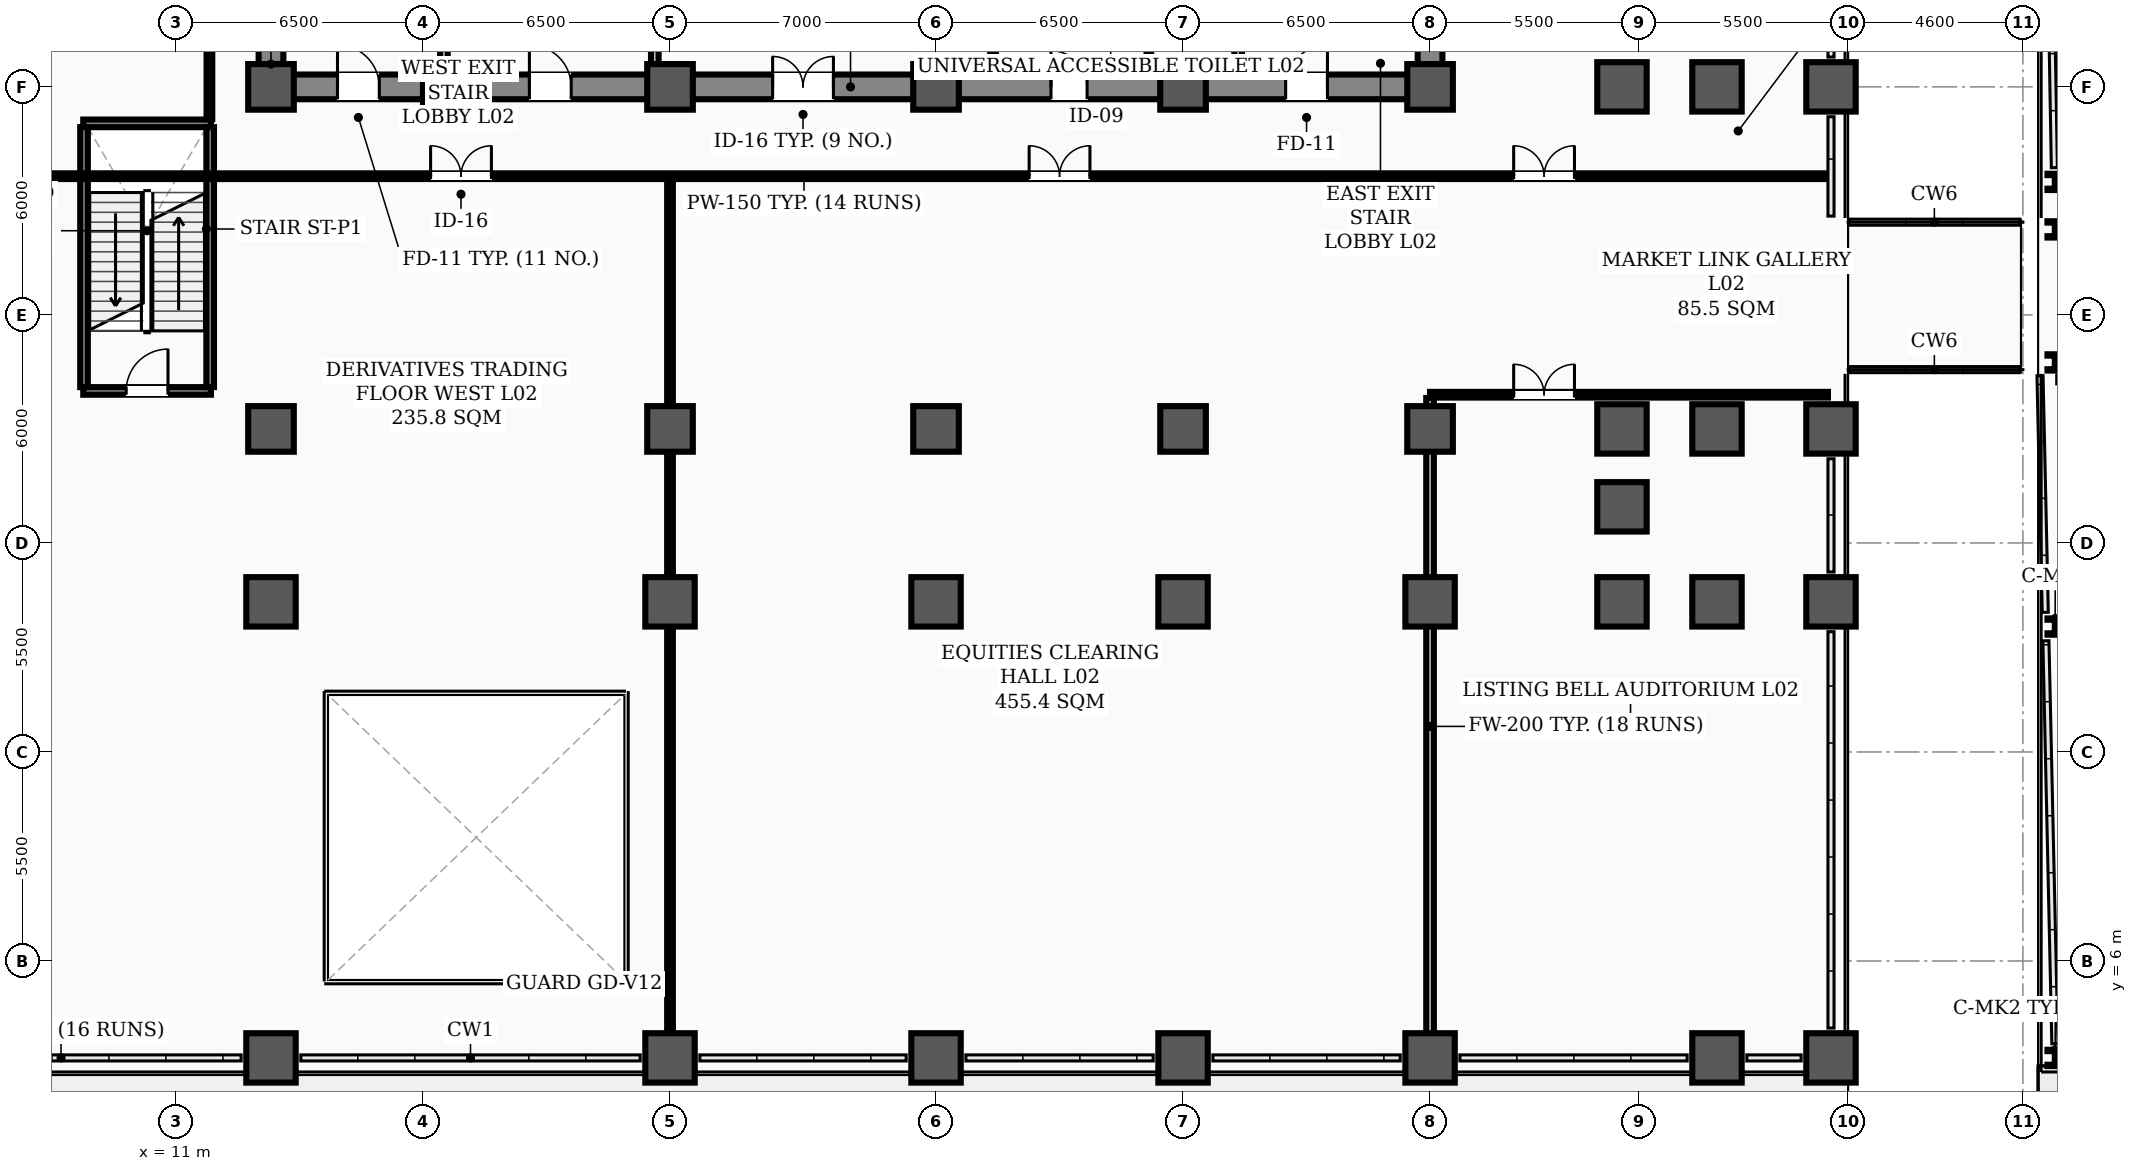
"""IFC4 building model, lengths in metres.
Left out: names, types, materials, properties, quantities, classifications, styles, units other than length and angle.
Written with IfcOpenShell. Run it as: python <this file> out.ifc"""

import sys

from ifc_helpers import new_model, si_unit, direction, frame, frame_2d, origin, origin_2d, place, context, subcontext, project, spatial, rectangle, hollow_rectangle, i_section, extrude, element, fill, save


model = new_model("IFC4")
c1 = context("Model", 3, precision=1e-05, world=origin(), true_north=direction((0.0, 1.0)))
c2 = subcontext(c1, "Body", "Model", "MODEL_VIEW")
j1 = project(units=[si_unit("LENGTHUNIT", "METRE"), si_unit("PLANEANGLEUNIT", "RADIAN")], contexts=[c1])
p1 = place(None, origin())
s1 = spatial("IfcSite", under=j1, at=p1, CompositionType="ELEMENT")
p2 = place(p1, origin())
s2 = spatial("IfcBuilding", under=s1, at=p2, CompositionType="ELEMENT")
p3 = place(p2, frame((0.0, 0.0, 5.8)))
s3 = spatial("IfcBuildingStorey", under=s2, at=p3, CompositionType="ELEMENT", Elevation=5.8)
for number, where, z_axis, x_axis in (
    (1, (13.5, 29.0, 0.0), (0.0, 0.0, 1.0), (1.0, 0.0, 0.0)),
    (2, (18.1, 29.0, 0.0), (0.0, 0.0, 1.0), (1.0, 0.0, 0.0)),
    (3, (24.0, 29.0, 0.0), (0.0, 0.0, 1.0), (1.0, 0.0, 0.0)),
    (4, (31.0, 29.0, 0.0), (0.0, 0.0, 1.0), (1.0, 0.0, 0.0)),
    (5, (37.5, 29.0, 0.0), (0.0, 0.0, 1.0), (1.0, 0.0, 0.0)),
    (6, (44.0, 29.0, 0.0), (0.0, 0.0, 1.0), (1.0, 0.0, 0.0)),
    (7, (13.5, 20.0, 0.0), (0.0, 0.0, 1.0), (1.0, 0.0, 0.0)),
    (8, (24.0, 20.0, 0.0), (0.0, 0.0, 1.0), (1.0, 0.0, 0.0)),
    (9, (31.0, 20.0, 0.0), (0.0, 0.0, 1.0), (1.0, 0.0, 0.0)),
    (10, (37.5, 20.0, 0.0), (0.0, 0.0, 1.0), (1.0, 0.0, 0.0)),
    (11, (44.0, 20.0, 0.0), (0.0, 0.0, 1.0), (1.0, 0.0, 0.0)),
):
    element("IfcColumn", number, at=place(p3, frame(where, z_axis=z_axis, x_axis=x_axis)), inside=s3, PredefinedType="COLUMN", context=c2, shape_type="SweptSolid", body=[
        extrude(hollow_rectangle(XDim=1.2, YDim=1.2, WallThickness=0.04, InnerFilletRadius=0.02, OuterFilletRadius=0.06, at=origin_2d()), origin(), (0.0, 0.0, 1.0), 5.4),
    ])
for number, where, z_axis, x_axis in (
    (12, (13.5, 3.45, 0.0), (0.0, 0.0, 1.0), (1.0, 0.0, 0.0)),
    (13, (13.5, 15.45, 0.0), (0.0, 0.0, 1.0), (1.0, 0.0, 0.0)),
    (14, (24.0, 3.45, 0.0), (0.0, 0.0, 1.0), (1.0, 0.0, 0.0)),
    (15, (24.0, 15.45, 0.0), (0.0, 0.0, 1.0), (1.0, 0.0, 0.0)),
    (16, (31.0, 3.45, 0.0), (0.0, 0.0, 1.0), (1.0, 0.0, 0.0)),
    (17, (31.0, 15.45, 0.0), (0.0, 0.0, 1.0), (1.0, 0.0, 0.0)),
    (18, (37.5, 3.45, 0.0), (0.0, 0.0, 1.0), (1.0, 0.0, 0.0)),
    (19, (37.5, 15.45, 0.0), (0.0, 0.0, 1.0), (1.0, 0.0, 0.0)),
    (20, (44.0, 3.45, 0.0), (0.0, 0.0, 1.0), (1.0, 0.0, 0.0)),
    (21, (44.0, 15.45, 0.0), (0.0, 0.0, 1.0), (1.0, 0.0, 0.0)),
    (22, (49.05, 15.45, 0.0), (0.0, 0.0, 1.0), (1.0, 0.0, 0.0)),
    (23, (49.05, 17.95, 0.0), (0.0, 0.0, 1.0), (1.0, 0.0, 0.0)),
    (24, (49.05, 20.0, 0.0), (0.0, 0.0, 1.0), (1.0, 0.0, 0.0)),
    (25, (49.05, 29.0, 0.0), (0.0, 0.0, 1.0), (1.0, 0.0, 0.0)),
    (26, (51.55, 3.45, 0.0), (0.0, 0.0, 1.0), (1.0, 0.0, 0.0)),
    (27, (51.55, 15.45, 0.0), (0.0, 0.0, 1.0), (1.0, 0.0, 0.0)),
    (28, (51.55, 20.0, 0.0), (0.0, 0.0, 1.0), (1.0, 0.0, 0.0)),
    (29, (51.55, 29.0, 0.0), (0.0, 0.0, 1.0), (1.0, 0.0, 0.0)),
    (30, (54.55, 3.45, 0.0), (0.0, 0.0, 1.0), (1.0, 0.0, 0.0)),
    (31, (54.55, 15.45, 0.0), (0.0, 0.0, 1.0), (1.0, 0.0, 0.0)),
    (32, (54.55, 20.0, 0.0), (0.0, 0.0, 1.0), (1.0, 0.0, 0.0)),
    (33, (54.55, 29.0, 0.0), (0.0, 0.0, 1.0), (1.0, 0.0, 0.0)),
):
    element("IfcColumn", number, at=place(p3, frame(where, z_axis=z_axis, x_axis=x_axis)), inside=s3, PredefinedType="COLUMN", context=c2, shape_type="SweptSolid", body=[
        extrude(rectangle(XDim=1.3, YDim=1.3, at=origin_2d()), origin(), (0.0, 0.0, 1.0), 5.4),
    ])
for number, where, z_axis, x_axis in (
    (34, (60.45, 3.45, 0.0), (0.0, 0.0, 1.0), (1.0, 0.0, 0.0)),
    (35, (60.45, 14.8, 0.0), (0.0, 0.0, 1.0), (1.0, 0.0, 0.0)),
    (36, (60.45, 21.75, 0.0), (0.0, 0.0, 1.0), (1.0, 0.0, 0.0)),
    (37, (60.45, 25.25, 0.0), (0.0, 0.0, 1.0), (1.0, 0.0, 0.0)),
    (38, (60.45, 26.5, 0.0), (0.0, 0.0, 1.0), (1.0, 0.0, 0.0)),
):
    element("IfcColumn", number, at=place(p3, frame(where, z_axis=z_axis, x_axis=x_axis)), inside=s3, PredefinedType="COLUMN", context=c2, shape_type="SweptSolid", body=[
        extrude(i_section(OverallWidth=0.407, OverallDepth=0.428, WebThickness=0.02, FlangeThickness=0.035, FilletRadius=0.022, at=origin_2d()), origin(), (0.0, 0.0, 1.0), 5.4),
    ])
p4 = place(p3, frame((60.45, 3.45, 0.0), z_axis=(0.0, 0.0, 1.0), x_axis=(1.0, 0.0, 0.0)))
e39 = element("IfcWall", 39, at=p4, inside=s3, PredefinedType="STANDARD", context=c2, shape_type="SweptSolid", body=[
    extrude(rectangle(XDim=16.7, YDim=0.25, at=frame_2d((8.35, 0.0))), origin(), (0.0, 0.0, 1.0), 4.5),
])
p5 = place(p4, frame((2.85, 0.0, 0.95)))
e40 = element("IfcOpeningElement", 40, at=p5, cuts=e39, PredefinedType="OPENING", context=c2, shape_type="SweptSolid", body=[
    extrude(rectangle(XDim=2.0, YDim=1.8, at=frame_2d((1.0, 0.9))), frame((0.0, 0.135, 0.0), z_axis=(0.0, -1.0, 0.0), x_axis=(1.0, 0.0, 0.0)), (0.0, 0.0, 1.0), 0.27),
])
p6 = place(p4, frame((11.35, 0.0, 0.95)))
e41 = element("IfcOpeningElement", 41, at=p6, cuts=e39, PredefinedType="OPENING", context=c2, shape_type="SweptSolid", body=[
    extrude(rectangle(XDim=2.0, YDim=1.8, at=frame_2d((1.0, 0.9))), frame((0.0, 0.135, 0.0), z_axis=(0.0, -1.0, 0.0), x_axis=(1.0, 0.0, 0.0)), (0.0, 0.0, 1.0), 0.27),
])
p7 = place(p3, frame((13.5, 29.0, 0.0), z_axis=(0.0, 0.0, 1.0), x_axis=(1.0, 0.0, 0.0)))
e42 = element("IfcWall", 42, at=p7, inside=s3, PredefinedType="SHEAR", context=c2, shape_type="SweptSolid", body=[
    extrude(rectangle(XDim=30.5, YDim=0.65, at=frame_2d((15.25, 0.0))), origin(), (0.0, 0.0, 1.0), 5.15),
])
p8 = place(p7, frame((1.75, 0.0, 0.0)))
e43 = element("IfcOpeningElement", 43, at=p8, cuts=e42, PredefinedType="OPENING", context=c2, shape_type="SweptSolid", body=[
    extrude(rectangle(XDim=1.1, YDim=2.08, at=frame_2d((0.55, 1.04))), frame((0.0, 0.335, 0.0), z_axis=(0.0, -1.0, 0.0), x_axis=(1.0, 0.0, 0.0)), (0.0, 0.0, 1.0), 0.67),
])
p9 = place(p7, frame((26.7, 0.0, 0.0)))
e44 = element("IfcOpeningElement", 44, at=p9, cuts=e42, PredefinedType="OPENING", context=c2, shape_type="SweptSolid", body=[
    extrude(rectangle(XDim=1.1, YDim=2.08, at=frame_2d((0.55, 1.04))), frame((0.0, 0.335, 0.0), z_axis=(0.0, -1.0, 0.0), x_axis=(1.0, 0.0, 0.0)), (0.0, 0.0, 1.0), 0.67),
])
p10 = place(p7, frame((6.8, 0.0, 0.0)))
e45 = element("IfcOpeningElement", 45, at=p10, cuts=e42, PredefinedType="OPENING", context=c2, shape_type="SweptSolid", body=[
    extrude(rectangle(XDim=1.1, YDim=2.08, at=frame_2d((0.55, 1.04))), frame((0.0, 0.335, 0.0), z_axis=(0.0, -1.0, 0.0), x_axis=(1.0, 0.0, 0.0)), (0.0, 0.0, 1.0), 0.67),
])
p11 = place(p7, frame((13.2, 0.0, 0.0)))
e46 = element("IfcOpeningElement", 46, at=p11, cuts=e42, PredefinedType="OPENING", context=c2, shape_type="SweptSolid", body=[
    extrude(rectangle(XDim=1.6, YDim=2.08, at=frame_2d((0.8, 1.04))), frame((0.0, 0.335, 0.0), z_axis=(0.0, -1.0, 0.0), x_axis=(1.0, 0.0, 0.0)), (0.0, 0.0, 1.0), 0.67),
])
p12 = place(p7, frame((20.525, 0.0, 0.0)))
e47 = element("IfcOpeningElement", 47, at=p12, cuts=e42, PredefinedType="OPENING", context=c2, shape_type="SweptSolid", body=[
    extrude(rectangle(XDim=0.95, YDim=2.08, at=frame_2d((0.475, 1.04))), frame((0.0, 0.335, 0.0), z_axis=(0.0, -1.0, 0.0), x_axis=(1.0, 0.0, 0.0)), (0.0, 0.0, 1.0), 0.67),
])
for number, where, z_axis, x_axis in (
    (48, (13.5, 29.35, 0.0), (0.0, 0.0, 1.0), (0.0, 1.0, 0.0)),
    (49, (44.0, 29.35, 0.0), (0.0, 0.0, 1.0), (0.0, 1.0, 0.0)),
):
    element("IfcWall", number, at=place(p3, frame(where, z_axis=z_axis, x_axis=x_axis)), inside=s3, PredefinedType="SHEAR", context=c2, shape_type="SweptSolid", body=[
        extrude(rectangle(XDim=8.6, YDim=0.65, at=frame_2d((4.3, 0.0))), origin(), (0.0, 0.0, 1.0), 5.15),
    ])
p13 = place(p3, frame((8.56, 21.0, 0.0), z_axis=(0.0, 0.0, 1.0), x_axis=(1.0, 0.0, 0.0)))
e50 = element("IfcWall", 50, at=p13, inside=s3, PredefinedType="STANDARD", context=c2, shape_type="SweptSolid", body=[
    extrude(rectangle(XDim=3.36, YDim=0.2, at=frame_2d((1.68, 0.0))), origin(), (0.0, 0.0, 1.0), 5.15),
])
p14 = place(p13, frame((1.13, 0.0, 0.0)))
e51 = element("IfcOpeningElement", 51, at=p14, cuts=e50, PredefinedType="OPENING", context=c2, shape_type="SweptSolid", body=[
    extrude(rectangle(XDim=1.1, YDim=2.08, at=frame_2d((0.55, 1.04))), frame((0.0, 0.11, 0.0), z_axis=(0.0, -1.0, 0.0), x_axis=(1.0, 0.0, 0.0)), (0.0, 0.0, 1.0), 0.22),
])
p15 = place(p3, frame((8.56, 28.04, 0.0), z_axis=(0.0, 0.0, 1.0), x_axis=(1.0, 0.0, 0.0)))
e52 = element("IfcWall", 52, at=p15, inside=s3, PredefinedType="STANDARD", context=c2, shape_type="SweptSolid", body=[
    extrude(rectangle(XDim=3.36, YDim=0.2, at=frame_2d((1.68, 0.0))), origin(), (0.0, 0.0, 1.0), 5.15),
])
for number, where, z_axis, x_axis in (
    (53, (8.58, 21.1, 0.0), (0.0, 0.0, 1.0), (0.0, 1.0, 0.0)),
    (54, (11.9, 21.1, 0.0), (0.0, 0.0, 1.0), (0.0, 1.0, 0.0)),
):
    element("IfcWall", number, at=place(p3, frame(where, z_axis=z_axis, x_axis=x_axis)), inside=s3, PredefinedType="STANDARD", context=c2, shape_type="SweptSolid", body=[
        extrude(rectangle(XDim=6.84, YDim=0.2, at=frame_2d((3.42, 0.0))), origin(), (0.0, 0.0, 1.0), 5.15),
    ])
p16 = place(p3, frame((0.58, 26.65, 0.0), z_axis=(0.0, 0.0, 1.0), x_axis=(1.0, 0.0, 0.0)))
e55 = element("IfcWall", 55, at=p16, inside=s3, PredefinedType="PARTITIONING", context=c2, shape_type="SweptSolid", body=[
    extrude(rectangle(XDim=53.89, YDim=0.15, at=frame_2d((26.945, 0.0))), origin(), (0.0, 0.0, 1.0), 4.43),
])
p17 = place(p16, frame((17.12, 0.0, 0.0)))
e56 = element("IfcOpeningElement", 56, at=p17, cuts=e55, PredefinedType="OPENING", context=c2, shape_type="SweptSolid", body=[
    extrude(rectangle(XDim=1.6, YDim=2.08, at=frame_2d((0.8, 1.04))), frame((0.0, 0.085, 0.0), z_axis=(0.0, -1.0, 0.0), x_axis=(1.0, 0.0, 0.0)), (0.0, 0.0, 1.0), 0.17),
])
p18 = place(p16, frame((32.87, 0.0, 0.0)))
e57 = element("IfcOpeningElement", 57, at=p18, cuts=e55, PredefinedType="OPENING", context=c2, shape_type="SweptSolid", body=[
    extrude(rectangle(XDim=1.6, YDim=2.08, at=frame_2d((0.8, 1.04))), frame((0.0, 0.085, 0.0), z_axis=(0.0, -1.0, 0.0), x_axis=(1.0, 0.0, 0.0)), (0.0, 0.0, 1.0), 0.17),
])
p19 = place(p16, frame((45.62, 0.0, 0.0)))
e58 = element("IfcOpeningElement", 58, at=p19, cuts=e55, PredefinedType="OPENING", context=c2, shape_type="SweptSolid", body=[
    extrude(rectangle(XDim=1.6, YDim=2.08, at=frame_2d((0.8, 1.04))), frame((0.0, 0.085, 0.0), z_axis=(0.0, -1.0, 0.0), x_axis=(1.0, 0.0, 0.0)), (0.0, 0.0, 1.0), 0.17),
])
p20 = place(p3, frame((44.0, 20.9, 0.0), z_axis=(0.0, 0.0, 1.0), x_axis=(1.0, 0.0, 0.0)))
e59 = element("IfcWall", 59, at=p20, inside=s3, PredefinedType="PARTITIONING", context=c2, shape_type="SweptSolid", body=[
    extrude(rectangle(XDim=10.47, YDim=0.15, at=frame_2d((5.235, 0.0))), origin(), (0.0, 0.0, 1.0), 4.43),
])
p21 = place(p20, frame((2.2, 0.0, 0.0)))
e60 = element("IfcOpeningElement", 60, at=p21, cuts=e59, PredefinedType="OPENING", context=c2, shape_type="SweptSolid", body=[
    extrude(rectangle(XDim=1.6, YDim=2.08, at=frame_2d((0.8, 1.04))), frame((0.0, 0.085, 0.0), z_axis=(0.0, -1.0, 0.0), x_axis=(1.0, 0.0, 0.0)), (0.0, 0.0, 1.0), 0.17),
])
p22 = place(p3, frame((24.0, 3.53, 0.0), z_axis=(0.0, 0.0, 1.0), x_axis=(0.0, 1.0, 0.0)))
e61 = element("IfcWall", 61, at=p22, inside=s3, PredefinedType="PARTITIONING", context=c2, shape_type="SweptSolid", body=[
    extrude(rectangle(XDim=23.035, YDim=0.15, at=frame_2d((11.518, 0.0))), origin(), (0.0, 0.0, 1.0), 4.33),
])
p23 = place(p3, frame((44.0, 3.53, 0.0), z_axis=(0.0, 0.0, 1.0), x_axis=(0.0, 1.0, 0.0)))
e62 = element("IfcWall", 62, at=p23, inside=s3, PredefinedType="STANDARD", context=c2, shape_type="SweptSolid", body=[
    extrude(rectangle(XDim=17.285, YDim=0.2, at=frame_2d((8.643, 0.0))), origin(), (0.0, 0.0, 1.0), 4.33),
])
p24 = place(p3, frame((11.88, 28.15, 0.0), z_axis=(0.0, 0.0, 1.0), x_axis=(0.0, 1.0, 0.0)))
e63 = element("IfcWall", 63, at=p24, inside=s3, PredefinedType="PARTITIONING", context=c2, shape_type="SweptSolid", body=[
    extrude(rectangle(XDim=12.165, YDim=0.15, at=frame_2d((6.083, 0.0))), origin(), (0.0, 0.0, 1.0), 4.33),
])
for number, where, z_axis, x_axis in (
    (64, (18.05, 29.335, 0.0), (0.0, 0.0, 1.0), (0.0, 1.0, 0.0)),
    (65, (38.95, 29.335, 0.0), (0.0, 0.0, 1.0), (0.0, 1.0, 0.0)),
):
    element("IfcWall", number, at=place(p3, frame(where, z_axis=z_axis, x_axis=x_axis)), inside=s3, PredefinedType="STANDARD", context=c2, shape_type="SweptSolid", body=[
        extrude(rectangle(XDim=0.965, YDim=0.2, at=frame_2d((0.482, 0.0))), origin(), (0.0, 0.0, 1.0), 4.33),
    ])
p25 = place(p3, frame((23.6, 29.335, 0.0), z_axis=(0.0, 0.0, 1.0), x_axis=(0.0, 1.0, 0.0)))
e66 = element("IfcWall", 66, at=p25, inside=s3, PredefinedType="STANDARD", context=c2, shape_type="SweptSolid", body=[
    extrude(rectangle(XDim=5.365, YDim=0.2, at=frame_2d((2.683, 0.0))), origin(), (0.0, 0.0, 1.0), 4.33),
])
p26 = place(p3, frame((32.5, 29.335, 0.0), z_axis=(0.0, 0.0, 1.0), x_axis=(0.0, 1.0, 0.0)))
e67 = element("IfcWall", 67, at=p26, inside=s3, PredefinedType="PARTITIONING", context=c2, shape_type="SweptSolid", body=[
    extrude(rectangle(XDim=2.43, YDim=0.15, at=frame_2d((1.215, 0.0))), origin(), (0.0, 0.0, 1.0), 4.33),
])
p27 = place(p3, frame((36.6, 29.335, 0.0), z_axis=(0.0, 0.0, 1.0), x_axis=(0.0, 1.0, 0.0)))
e68 = element("IfcWall", 68, at=p27, inside=s3, PredefinedType="PARTITIONING", context=c2, shape_type="SweptSolid", body=[
    extrude(rectangle(XDim=2.43, YDim=0.12, at=frame_2d((1.215, 0.0))), origin(), (0.0, 0.0, 1.0), 4.33),
])
p28 = place(p14, origin())
e69 = element("IfcDoor", 69, at=p28, inside=s3, OperationType="SINGLE_SWING_RIGHT", PredefinedType="DOOR", context=c2, shape_type="SweptSolid", body=[
    extrude(rectangle(XDim=1.1, YDim=2.08, at=frame_2d((0.55, 1.04))), frame((0.0, 0.025, 0.0), z_axis=(0.0, -1.0, 0.0), x_axis=(1.0, 0.0, 0.0)), (0.0, 0.0, 1.0), 0.05),
])
fill(e51, e69)
p29 = place(p17, origin())
e70 = element("IfcDoor", 70, at=p29, inside=s3, OperationType="DOUBLE_DOOR_SINGLE_SWING", PredefinedType="DOOR", context=c2, shape_type="SweptSolid", body=[
    extrude(rectangle(XDim=1.6, YDim=2.08, at=frame_2d((0.8, 1.04))), frame((0.0, 0.025, 0.0), z_axis=(0.0, -1.0, 0.0), x_axis=(1.0, 0.0, 0.0)), (0.0, 0.0, 1.0), 0.05),
])
fill(e56, e70)
p30 = place(p18, origin())
e71 = element("IfcDoor", 71, at=p30, inside=s3, OperationType="DOUBLE_DOOR_SINGLE_SWING", PredefinedType="DOOR", context=c2, shape_type="SweptSolid", body=[
    extrude(rectangle(XDim=1.6, YDim=2.08, at=frame_2d((0.8, 1.04))), frame((0.0, 0.025, 0.0), z_axis=(0.0, -1.0, 0.0), x_axis=(1.0, 0.0, 0.0)), (0.0, 0.0, 1.0), 0.05),
])
fill(e57, e71)
p31 = place(p21, origin())
e72 = element("IfcDoor", 72, at=p31, inside=s3, OperationType="DOUBLE_DOOR_SINGLE_SWING", PredefinedType="DOOR", context=c2, shape_type="SweptSolid", body=[
    extrude(rectangle(XDim=1.6, YDim=2.08, at=frame_2d((0.8, 1.04))), frame((0.0, 0.025, 0.0), z_axis=(0.0, -1.0, 0.0), x_axis=(1.0, 0.0, 0.0)), (0.0, 0.0, 1.0), 0.05),
])
fill(e60, e72)
p32 = place(p19, origin())
e73 = element("IfcDoor", 73, at=p32, inside=s3, OperationType="DOUBLE_DOOR_SINGLE_SWING", PredefinedType="DOOR", context=c2, shape_type="SweptSolid", body=[
    extrude(rectangle(XDim=1.6, YDim=2.08, at=frame_2d((0.8, 1.04))), frame((0.0, 0.025, 0.0), z_axis=(0.0, -1.0, 0.0), x_axis=(1.0, 0.0, 0.0)), (0.0, 0.0, 1.0), 0.05),
])
fill(e58, e73)
p33 = place(p8, origin())
e74 = element("IfcDoor", 74, at=p33, inside=s3, OperationType="SINGLE_SWING_LEFT", PredefinedType="DOOR", context=c2, shape_type="SweptSolid", body=[
    extrude(rectangle(XDim=1.1, YDim=2.08, at=frame_2d((0.55, 1.04))), frame((0.0, 0.025, 0.0), z_axis=(0.0, -1.0, 0.0), x_axis=(1.0, 0.0, 0.0)), (0.0, 0.0, 1.0), 0.05),
])
fill(e43, e74)
p34 = place(p9, origin())
e75 = element("IfcDoor", 75, at=p34, inside=s3, OperationType="SINGLE_SWING_RIGHT", PredefinedType="DOOR", context=c2, shape_type="SweptSolid", body=[
    extrude(rectangle(XDim=1.1, YDim=2.08, at=frame_2d((0.55, 1.04))), frame((0.0, 0.025, 0.0), z_axis=(0.0, -1.0, 0.0), x_axis=(1.0, 0.0, 0.0)), (0.0, 0.0, 1.0), 0.05),
])
fill(e44, e75)
p35 = place(p10, origin())
e76 = element("IfcDoor", 76, at=p35, inside=s3, OperationType="SINGLE_SWING_LEFT", PredefinedType="DOOR", context=c2, shape_type="SweptSolid", body=[
    extrude(rectangle(XDim=1.1, YDim=2.08, at=frame_2d((0.55, 1.04))), frame((0.0, 0.025, 0.0), z_axis=(0.0, -1.0, 0.0), x_axis=(1.0, 0.0, 0.0)), (0.0, 0.0, 1.0), 0.05),
])
fill(e45, e76)
p36 = place(p11, origin())
e77 = element("IfcDoor", 77, at=p36, inside=s3, OperationType="DOUBLE_DOOR_SINGLE_SWING", PredefinedType="DOOR", context=c2, shape_type="SweptSolid", body=[
    extrude(rectangle(XDim=1.6, YDim=2.08, at=frame_2d((0.8, 1.04))), frame((0.0, 0.025, 0.0), z_axis=(0.0, -1.0, 0.0), x_axis=(1.0, 0.0, 0.0)), (0.0, 0.0, 1.0), 0.05),
])
fill(e46, e77)
p37 = place(p12, origin())
e78 = element("IfcDoor", 78, at=p37, inside=s3, OperationType="SINGLE_SWING_LEFT", PredefinedType="DOOR", context=c2, shape_type="SweptSolid", body=[
    extrude(rectangle(XDim=0.95, YDim=2.08, at=frame_2d((0.475, 1.04))), frame((0.0, 0.025, 0.0), z_axis=(0.0, -1.0, 0.0), x_axis=(1.0, 0.0, 0.0)), (0.0, 0.0, 1.0), 0.05),
])
fill(e47, e78)
save(model, sys.argv[1])
